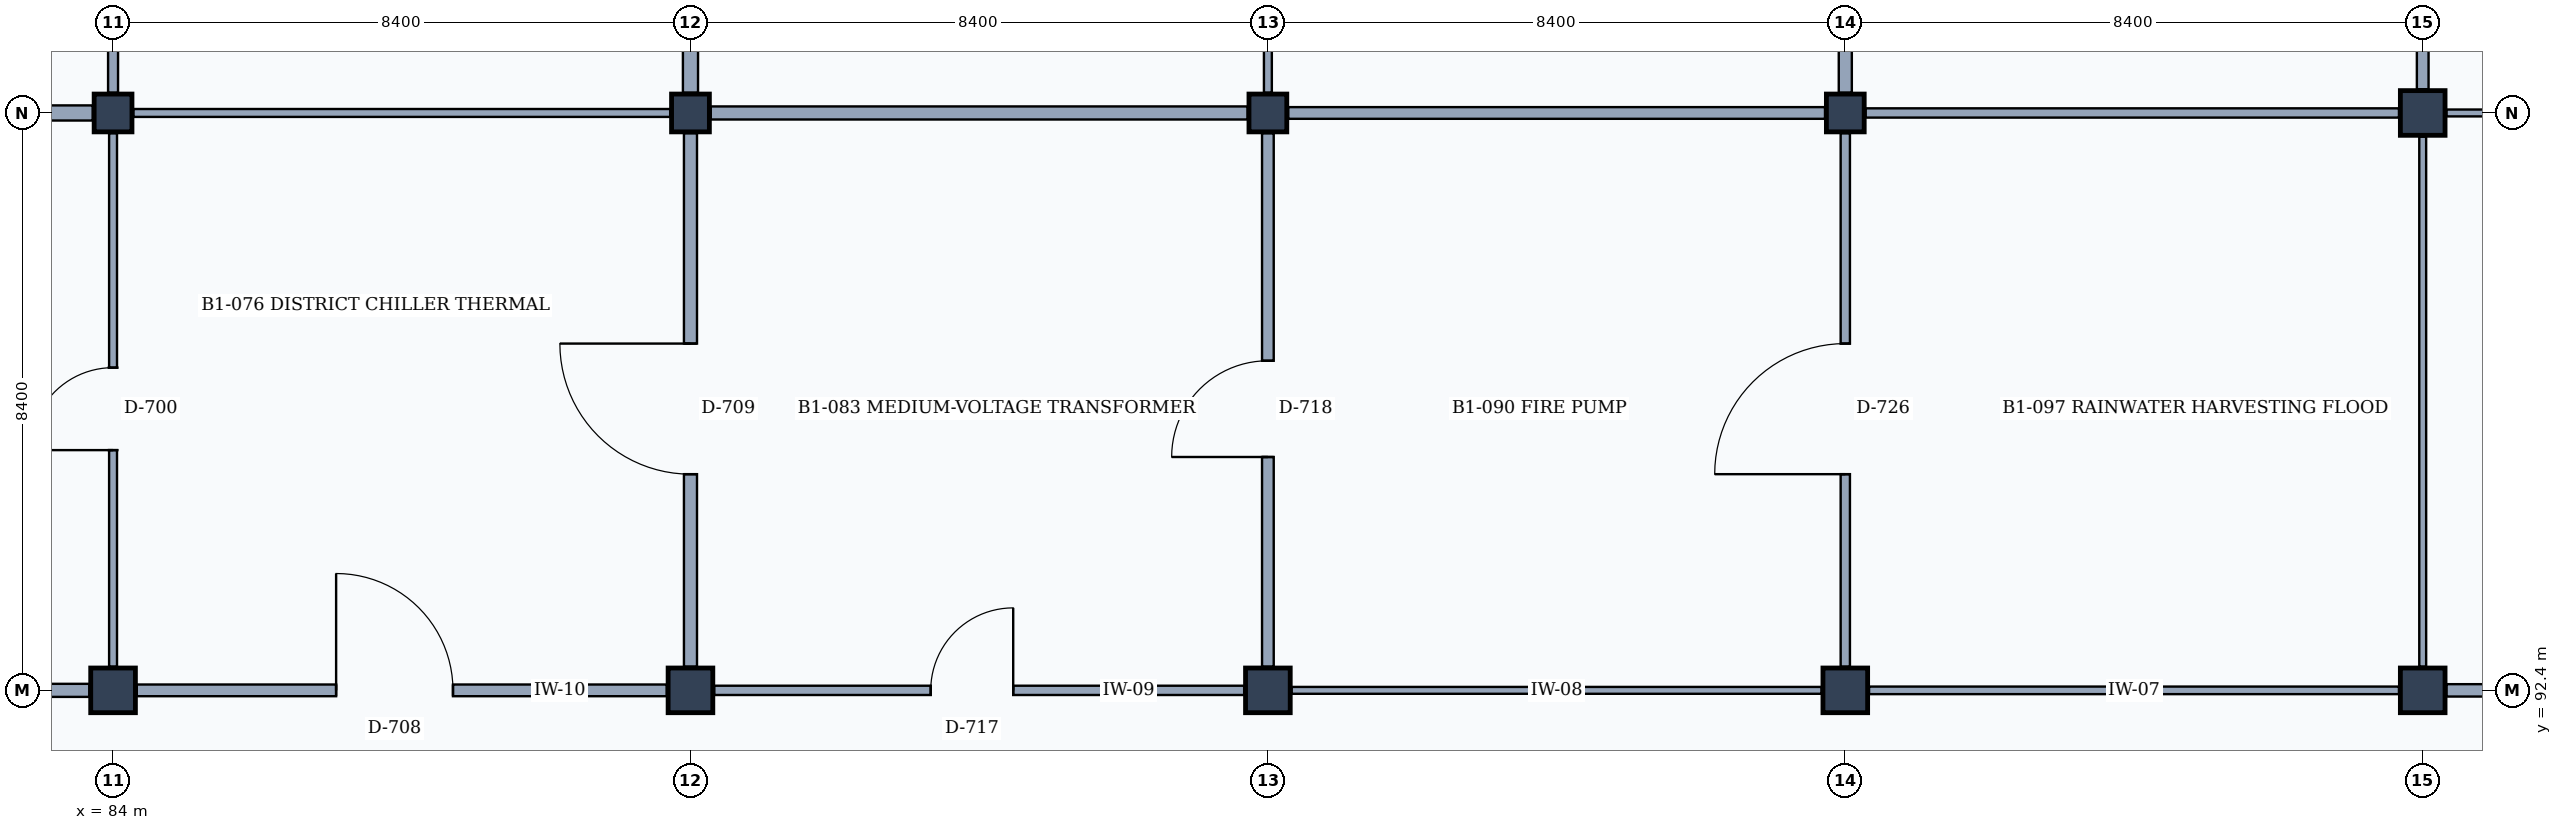
"""IFC4 building model, lengths in metres.
Left out: names, types, materials, properties, quantities, classifications, styles, units other than length and angle.
Written with IfcOpenShell. Run it as: python <this file> out.ifc"""

import sys

from ifc_helpers import new_model, si_unit, direction, frame, frame_2d, origin, origin_2d, place, context, subcontext, project, spatial, rectangle, extrude, element, fill, save


model = new_model("IFC4")
c1 = context("Model", 3, precision=1e-05, world=origin(), true_north=direction((0.0, 1.0)))
c2 = subcontext(c1, "Body", "Model", "MODEL_VIEW")
j1 = project(units=[si_unit("LENGTHUNIT", "METRE"), si_unit("PLANEANGLEUNIT", "RADIAN")], contexts=[c1])
p1 = place(None, origin())
s1 = spatial("IfcSite", under=j1, at=p1, CompositionType="ELEMENT")
p2 = place(p1, origin())
s2 = spatial("IfcBuilding", under=s1, at=p2, CompositionType="ELEMENT")
p3 = place(p2, frame((0.0, 0.0, -4.2)))
s3 = spatial("IfcBuildingStorey", under=s2, at=p3, CompositionType="ELEMENT", Elevation=-4.2)
p4 = place(p3, frame((84.0, 92.4, 0.0), z_axis=(0.0, 0.0, 1.0), x_axis=(1.0, 0.0, 0.0)))
e1 = element("IfcColumn", 1, at=p4, inside=s3, PredefinedType="COLUMN", context=c2, shape_type="SweptSolid", body=[
    extrude(rectangle(XDim=0.65, YDim=0.65, at=origin_2d()), origin(), (0.0, 0.0, 1.0), 4.2),
])
p5 = place(p3, frame((84.0, 100.8, 0.0), z_axis=(0.0, 0.0, 1.0), x_axis=(1.0, 0.0, 0.0)))
e2 = element("IfcColumn", 2, at=p5, inside=s3, PredefinedType="COLUMN", context=c2, shape_type="SweptSolid", body=[
    extrude(rectangle(XDim=0.55, YDim=0.55, at=origin_2d()), origin(), (0.0, 0.0, 1.0), 4.2),
])
p6 = place(p3, frame((92.4, 92.4, 0.0), z_axis=(0.0, 0.0, 1.0), x_axis=(1.0, 0.0, 0.0)))
e3 = element("IfcColumn", 3, at=p6, inside=s3, PredefinedType="COLUMN", context=c2, shape_type="SweptSolid", body=[
    extrude(rectangle(XDim=0.65, YDim=0.65, at=origin_2d()), origin(), (0.0, 0.0, 1.0), 4.2),
])
p7 = place(p3, frame((92.4, 100.8, 0.0), z_axis=(0.0, 0.0, 1.0), x_axis=(1.0, 0.0, 0.0)))
e4 = element("IfcColumn", 4, at=p7, inside=s3, PredefinedType="COLUMN", context=c2, shape_type="SweptSolid", body=[
    extrude(rectangle(XDim=0.55, YDim=0.55, at=origin_2d()), origin(), (0.0, 0.0, 1.0), 4.2),
])
p8 = place(p3, frame((100.8, 92.4, 0.0), z_axis=(0.0, 0.0, 1.0), x_axis=(1.0, 0.0, 0.0)))
e5 = element("IfcColumn", 5, at=p8, inside=s3, PredefinedType="COLUMN", context=c2, shape_type="SweptSolid", body=[
    extrude(rectangle(XDim=0.65, YDim=0.65, at=origin_2d()), origin(), (0.0, 0.0, 1.0), 4.2),
])
p9 = place(p3, frame((100.8, 100.8, 0.0), z_axis=(0.0, 0.0, 1.0), x_axis=(1.0, 0.0, 0.0)))
e6 = element("IfcColumn", 6, at=p9, inside=s3, PredefinedType="COLUMN", context=c2, shape_type="SweptSolid", body=[
    extrude(rectangle(XDim=0.55, YDim=0.55, at=origin_2d()), origin(), (0.0, 0.0, 1.0), 4.2),
])
p10 = place(p3, frame((109.2, 92.4, 0.0), z_axis=(0.0, 0.0, 1.0), x_axis=(1.0, 0.0, 0.0)))
e7 = element("IfcColumn", 7, at=p10, inside=s3, PredefinedType="COLUMN", context=c2, shape_type="SweptSolid", body=[
    extrude(rectangle(XDim=0.65, YDim=0.65, at=origin_2d()), origin(), (0.0, 0.0, 1.0), 4.2),
])
p11 = place(p3, frame((109.2, 100.8, 0.0), z_axis=(0.0, 0.0, 1.0), x_axis=(1.0, 0.0, 0.0)))
e8 = element("IfcColumn", 8, at=p11, inside=s3, PredefinedType="COLUMN", context=c2, shape_type="SweptSolid", body=[
    extrude(rectangle(XDim=0.55, YDim=0.55, at=origin_2d()), origin(), (0.0, 0.0, 1.0), 4.2),
])
for number, where, z_axis, x_axis in (
    (9, (117.6, 92.4, 0.0), (0.0, 0.0, 1.0), (1.0, 0.0, 0.0)),
    (10, (117.6, 100.8, 0.0), (0.0, 0.0, 1.0), (1.0, 0.0, 0.0)),
):
    element("IfcColumn", number, at=place(p3, frame(where, z_axis=z_axis, x_axis=x_axis)), inside=s3, PredefinedType="COLUMN", context=c2, shape_type="SweptSolid", body=[
        extrude(rectangle(XDim=0.65, YDim=0.65, at=origin_2d()), origin(), (0.0, 0.0, 1.0), 4.2),
    ])
p12 = place(p3, frame((75.945, 92.4, 0.0), z_axis=(0.0, 0.0, 1.0), x_axis=(1.0, 0.0, 0.0)))
e11 = element("IfcWall", 11, at=p12, inside=s3, PredefinedType="PARTITIONING", context=c2, shape_type="SweptSolid", body=[
    extrude(rectangle(XDim=7.71, YDim=0.19, at=frame_2d((3.855, 0.0))), origin(), (0.0, 0.0, 1.0), 2.93),
])
p13 = place(p12, frame((2.85, 0.0, 0.0)))
e12 = element("IfcOpeningElement", 12, at=p13, cuts=e11, PredefinedType="OPENING", context=c2, shape_type="SweptSolid", body=[
    extrude(rectangle(XDim=1.8, YDim=2.3, at=frame_2d((0.9, 1.15))), frame((0.0, 0.105, 0.0), z_axis=(0.0, -1.0, 0.0), x_axis=(1.0, 0.0, 0.0)), (0.0, 0.0, 1.0), 0.21),
])
p14 = place(p3, frame((84.0, 92.745, 0.0), z_axis=(0.0, 0.0, 1.0), x_axis=(0.0, 1.0, 0.0)))
e13 = element("IfcWall", 13, at=p14, inside=s3, PredefinedType="PARTITIONING", context=c2, shape_type="SweptSolid", body=[
    extrude(rectangle(XDim=7.76, YDim=0.115, at=frame_2d((3.88, 0.0))), origin(), (0.0, 0.0, 1.0), 3.23),
])
p15 = place(p14, frame((3.15, 0.0, 0.0)))
e14 = element("IfcOpeningElement", 14, at=p15, cuts=e13, PredefinedType="OPENING", context=c2, shape_type="SweptSolid", body=[
    extrude(rectangle(XDim=1.2, YDim=2.2, at=frame_2d((0.6, 1.1))), frame((0.0, 0.067, 0.0), z_axis=(0.0, -1.0, 0.0), x_axis=(1.0, 0.0, 0.0)), (0.0, 0.0, 1.0), 0.135),
])
p16 = place(p3, frame((75.895, 100.8, 0.0), z_axis=(0.0, 0.0, 1.0), x_axis=(1.0, 0.0, 0.0)))
e15 = element("IfcWall", 15, at=p16, inside=s3, PredefinedType="PARTITIONING", context=c2, shape_type="SweptSolid", body=[
    extrude(rectangle(XDim=7.81, YDim=0.22, at=frame_2d((3.905, 0.0))), origin(), (0.0, 0.0, 1.0), 2.93),
])
p17 = place(p3, frame((84.0, 101.095, 0.0), z_axis=(0.0, 0.0, 1.0), x_axis=(0.0, 1.0, 0.0)))
e16 = element("IfcWall", 16, at=p17, inside=s3, PredefinedType="PARTITIONING", context=c2, shape_type="SweptSolid", body=[
    extrude(rectangle(XDim=7.81, YDim=0.145, at=frame_2d((3.905, 0.0))), origin(), (0.0, 0.0, 1.0), 3.23),
])
p18 = place(p17, frame((3.05, 0.0, 0.0)))
e17 = element("IfcOpeningElement", 17, at=p18, cuts=e16, PredefinedType="OPENING", context=c2, shape_type="SweptSolid", body=[
    extrude(rectangle(XDim=1.4, YDim=2.25, at=frame_2d((0.7, 1.125))), frame((0.0, 0.083, 0.0), z_axis=(0.0, -1.0, 0.0), x_axis=(1.0, 0.0, 0.0)), (0.0, 0.0, 1.0), 0.165),
])
p19 = place(p3, frame((84.345, 92.4, 0.0), z_axis=(0.0, 0.0, 1.0), x_axis=(1.0, 0.0, 0.0)))
e18 = element("IfcWall", 18, at=p19, inside=s3, PredefinedType="PARTITIONING", context=c2, shape_type="SweptSolid", body=[
    extrude(rectangle(XDim=7.71, YDim=0.17, at=frame_2d((3.855, 0.0))), origin(), (0.0, 0.0, 1.0), 2.93),
])
p20 = place(p19, frame((2.9, 0.0, 0.0)))
e19 = element("IfcOpeningElement", 19, at=p20, cuts=e18, PredefinedType="OPENING", context=c2, shape_type="SweptSolid", body=[
    extrude(rectangle(XDim=1.7, YDim=2.3, at=frame_2d((0.85, 1.15))), frame((0.0, 0.095, 0.0), z_axis=(0.0, -1.0, 0.0), x_axis=(1.0, 0.0, 0.0)), (0.0, 0.0, 1.0), 0.19),
])
p21 = place(p3, frame((92.4, 92.745, 0.0), z_axis=(0.0, 0.0, 1.0), x_axis=(0.0, 1.0, 0.0)))
e20 = element("IfcWall", 20, at=p21, inside=s3, PredefinedType="PARTITIONING", context=c2, shape_type="SweptSolid", body=[
    extrude(rectangle(XDim=7.76, YDim=0.19, at=frame_2d((3.88, 0.0))), origin(), (0.0, 0.0, 1.0), 3.23),
])
p22 = place(p21, frame((2.8, 0.0, 0.0)))
e21 = element("IfcOpeningElement", 21, at=p22, cuts=e20, PredefinedType="OPENING", context=c2, shape_type="SweptSolid", body=[
    extrude(rectangle(XDim=1.9, YDim=2.4, at=frame_2d((0.95, 1.2))), frame((0.0, 0.105, 0.0), z_axis=(0.0, -1.0, 0.0), x_axis=(1.0, 0.0, 0.0)), (0.0, 0.0, 1.0), 0.21),
])
p23 = place(p3, frame((84.295, 100.8, 0.0), z_axis=(0.0, 0.0, 1.0), x_axis=(1.0, 0.0, 0.0)))
e22 = element("IfcWall", 22, at=p23, inside=s3, PredefinedType="PARTITIONING", context=c2, shape_type="SweptSolid", body=[
    extrude(rectangle(XDim=7.81, YDim=0.115, at=frame_2d((3.905, 0.0))), origin(), (0.0, 0.0, 1.0), 2.93),
])
p24 = place(p3, frame((92.4, 101.095, 0.0), z_axis=(0.0, 0.0, 1.0), x_axis=(0.0, 1.0, 0.0)))
e23 = element("IfcWall", 23, at=p24, inside=s3, PredefinedType="PARTITIONING", context=c2, shape_type="SweptSolid", body=[
    extrude(rectangle(XDim=7.81, YDim=0.22, at=frame_2d((3.905, 0.0))), origin(), (0.0, 0.0, 1.0), 3.23),
])
p25 = place(p24, frame((3.3, 0.0, 0.0)))
e24 = element("IfcOpeningElement", 24, at=p25, cuts=e23, PredefinedType="OPENING", context=c2, shape_type="SweptSolid", body=[
    extrude(rectangle(XDim=0.9, YDim=2.1, at=frame_2d((0.45, 1.05))), frame((0.0, 0.12, 0.0), z_axis=(0.0, -1.0, 0.0), x_axis=(1.0, 0.0, 0.0)), (0.0, 0.0, 1.0), 0.24),
])
p26 = place(p3, frame((92.745, 92.4, 0.0), z_axis=(0.0, 0.0, 1.0), x_axis=(1.0, 0.0, 0.0)))
e25 = element("IfcWall", 25, at=p26, inside=s3, PredefinedType="PARTITIONING", context=c2, shape_type="SweptSolid", body=[
    extrude(rectangle(XDim=7.71, YDim=0.135, at=frame_2d((3.855, 0.0))), origin(), (0.0, 0.0, 1.0), 2.93),
])
p27 = place(p26, frame((3.15, 0.0, 0.0)))
e26 = element("IfcOpeningElement", 26, at=p27, cuts=e25, PredefinedType="OPENING", context=c2, shape_type="SweptSolid", body=[
    extrude(rectangle(XDim=1.2, YDim=2.2, at=frame_2d((0.6, 1.1))), frame((0.0, 0.077, 0.0), z_axis=(0.0, -1.0, 0.0), x_axis=(1.0, 0.0, 0.0)), (0.0, 0.0, 1.0), 0.155),
])
p28 = place(p3, frame((100.8, 92.745, 0.0), z_axis=(0.0, 0.0, 1.0), x_axis=(0.0, 1.0, 0.0)))
e27 = element("IfcWall", 27, at=p28, inside=s3, PredefinedType="PARTITIONING", context=c2, shape_type="SweptSolid", body=[
    extrude(rectangle(XDim=7.76, YDim=0.17, at=frame_2d((3.88, 0.0))), origin(), (0.0, 0.0, 1.0), 3.23),
])
p29 = place(p28, frame((3.05, 0.0, 0.0)))
e28 = element("IfcOpeningElement", 28, at=p29, cuts=e27, PredefinedType="OPENING", context=c2, shape_type="SweptSolid", body=[
    extrude(rectangle(XDim=1.4, YDim=2.25, at=frame_2d((0.7, 1.125))), frame((0.0, 0.095, 0.0), z_axis=(0.0, -1.0, 0.0), x_axis=(1.0, 0.0, 0.0)), (0.0, 0.0, 1.0), 0.19),
])
p30 = place(p3, frame((92.695, 100.8, 0.0), z_axis=(0.0, 0.0, 1.0), x_axis=(1.0, 0.0, 0.0)))
e29 = element("IfcWall", 29, at=p30, inside=s3, PredefinedType="PARTITIONING", context=c2, shape_type="SweptSolid", body=[
    extrude(rectangle(XDim=7.81, YDim=0.19, at=frame_2d((3.905, 0.0))), origin(), (0.0, 0.0, 1.0), 2.93),
])
p31 = place(p3, frame((100.8, 101.095, 0.0), z_axis=(0.0, 0.0, 1.0), x_axis=(0.0, 1.0, 0.0)))
e30 = element("IfcWall", 30, at=p31, inside=s3, PredefinedType="PARTITIONING", context=c2, shape_type="SweptSolid", body=[
    extrude(rectangle(XDim=7.81, YDim=0.115, at=frame_2d((3.905, 0.0))), origin(), (0.0, 0.0, 1.0), 3.23),
])
p32 = place(p31, frame((3.0, 0.0, 0.0)))
e31 = element("IfcOpeningElement", 31, at=p32, cuts=e30, PredefinedType="OPENING", context=c2, shape_type="SweptSolid", body=[
    extrude(rectangle(XDim=1.5, YDim=2.3, at=frame_2d((0.75, 1.15))), frame((0.0, 0.067, 0.0), z_axis=(0.0, -1.0, 0.0), x_axis=(1.0, 0.0, 0.0)), (0.0, 0.0, 1.0), 0.135),
])
p33 = place(p3, frame((101.145, 92.4, 0.0), z_axis=(0.0, 0.0, 1.0), x_axis=(1.0, 0.0, 0.0)))
e32 = element("IfcWall", 32, at=p33, inside=s3, PredefinedType="MOVABLE", context=c2, shape_type="SweptSolid", body=[
    extrude(rectangle(XDim=7.71, YDim=0.1, at=frame_2d((3.855, 0.0))), origin(), (0.0, 0.0, 1.0), 2.93),
])
p34 = place(p3, frame((109.2, 92.745, 0.0), z_axis=(0.0, 0.0, 1.0), x_axis=(0.0, 1.0, 0.0)))
e33 = element("IfcWall", 33, at=p34, inside=s3, PredefinedType="PARTITIONING", context=c2, shape_type="SweptSolid", body=[
    extrude(rectangle(XDim=7.76, YDim=0.135, at=frame_2d((3.88, 0.0))), origin(), (0.0, 0.0, 1.0), 3.23),
])
p35 = place(p34, frame((2.8, 0.0, 0.0)))
e34 = element("IfcOpeningElement", 34, at=p35, cuts=e33, PredefinedType="OPENING", context=c2, shape_type="SweptSolid", body=[
    extrude(rectangle(XDim=1.9, YDim=2.4, at=frame_2d((0.95, 1.2))), frame((0.0, 0.077, 0.0), z_axis=(0.0, -1.0, 0.0), x_axis=(1.0, 0.0, 0.0)), (0.0, 0.0, 1.0), 0.155),
])
p36 = place(p3, frame((101.095, 100.8, 0.0), z_axis=(0.0, 0.0, 1.0), x_axis=(1.0, 0.0, 0.0)))
e35 = element("IfcWall", 35, at=p36, inside=s3, PredefinedType="PARTITIONING", context=c2, shape_type="SweptSolid", body=[
    extrude(rectangle(XDim=7.81, YDim=0.17, at=frame_2d((3.905, 0.0))), origin(), (0.0, 0.0, 1.0), 2.93),
])
p37 = place(p3, frame((109.2, 101.095, 0.0), z_axis=(0.0, 0.0, 1.0), x_axis=(0.0, 1.0, 0.0)))
e36 = element("IfcWall", 36, at=p37, inside=s3, PredefinedType="PARTITIONING", context=c2, shape_type="SweptSolid", body=[
    extrude(rectangle(XDim=7.81, YDim=0.19, at=frame_2d((3.905, 0.0))), origin(), (0.0, 0.0, 1.0), 3.23),
])
p38 = place(p37, frame((3.3, 0.0, 0.0)))
e37 = element("IfcOpeningElement", 37, at=p38, cuts=e36, PredefinedType="OPENING", context=c2, shape_type="SweptSolid", body=[
    extrude(rectangle(XDim=0.9, YDim=2.1, at=frame_2d((0.45, 1.05))), frame((0.0, 0.105, 0.0), z_axis=(0.0, -1.0, 0.0), x_axis=(1.0, 0.0, 0.0)), (0.0, 0.0, 1.0), 0.21),
])
p39 = place(p3, frame((109.545, 92.4, 0.0), z_axis=(0.0, 0.0, 1.0), x_axis=(1.0, 0.0, 0.0)))
e38 = element("IfcWall", 38, at=p39, inside=s3, PredefinedType="PARTITIONING", context=c2, shape_type="SweptSolid", body=[
    extrude(rectangle(XDim=7.71, YDim=0.11, at=frame_2d((3.855, 0.0))), origin(), (0.0, 0.0, 1.0), 2.93),
])
p40 = place(p3, frame((117.6, 92.745, 0.0), z_axis=(0.0, 0.0, 1.0), x_axis=(0.0, 1.0, 0.0)))
e39 = element("IfcWall", 39, at=p40, inside=s3, PredefinedType="MOVABLE", context=c2, shape_type="SweptSolid", body=[
    extrude(rectangle(XDim=7.71, YDim=0.1, at=frame_2d((3.855, 0.0))), origin(), (0.0, 0.0, 1.0), 3.23),
])
p41 = place(p3, frame((109.495, 100.8, 0.0), z_axis=(0.0, 0.0, 1.0), x_axis=(1.0, 0.0, 0.0)))
e40 = element("IfcWall", 40, at=p41, inside=s3, PredefinedType="PARTITIONING", context=c2, shape_type="SweptSolid", body=[
    extrude(rectangle(XDim=7.76, YDim=0.135, at=frame_2d((3.88, 0.0))), origin(), (0.0, 0.0, 1.0), 2.93),
])
p42 = place(p3, frame((117.6, 101.145, 0.0), z_axis=(0.0, 0.0, 1.0), x_axis=(0.0, 1.0, 0.0)))
e41 = element("IfcWall", 41, at=p42, inside=s3, PredefinedType="PARTITIONING", context=c2, shape_type="SweptSolid", body=[
    extrude(rectangle(XDim=7.71, YDim=0.17, at=frame_2d((3.855, 0.0))), origin(), (0.0, 0.0, 1.0), 3.23),
])
p43 = place(p3, frame((117.945, 92.4, 0.0), z_axis=(0.0, 0.0, 1.0), x_axis=(1.0, 0.0, 0.0)))
e42 = element("IfcWall", 42, at=p43, inside=s3, PredefinedType="PARTITIONING", context=c2, shape_type="SweptSolid", body=[
    extrude(rectangle(XDim=7.71, YDim=0.18, at=frame_2d((3.855, 0.0))), origin(), (0.0, 0.0, 1.0), 2.93),
])
p44 = place(p43, frame((3.1, 0.0, 0.0)))
e43 = element("IfcOpeningElement", 43, at=p44, cuts=e42, PredefinedType="OPENING", context=c2, shape_type="SweptSolid", body=[
    extrude(rectangle(XDim=1.3, YDim=2.2, at=frame_2d((0.65, 1.1))), frame((0.0, 0.1, 0.0), z_axis=(0.0, -1.0, 0.0), x_axis=(1.0, 0.0, 0.0)), (0.0, 0.0, 1.0), 0.2),
])
p45 = place(p3, frame((117.945, 100.8, 0.0), z_axis=(0.0, 0.0, 1.0), x_axis=(1.0, 0.0, 0.0)))
e44 = element("IfcWall", 44, at=p45, inside=s3, PredefinedType="MOVABLE", context=c2, shape_type="SweptSolid", body=[
    extrude(rectangle(XDim=7.71, YDim=0.1, at=frame_2d((3.855, 0.0))), origin(), (0.0, 0.0, 1.0), 2.93),
])
p46 = place(p15, origin())
e45 = element("IfcDoor", 45, at=p46, inside=s3, OperationType="SINGLE_SWING_LEFT", PredefinedType="DOOR", context=c2, shape_type="SweptSolid", body=[
    extrude(rectangle(XDim=1.2, YDim=2.2, at=frame_2d((0.6, 1.1))), frame((0.0, 0.025, 0.0), z_axis=(0.0, -1.0, 0.0), x_axis=(1.0, 0.0, 0.0)), (0.0, 0.0, 1.0), 0.05),
])
fill(e14, e45)
p47 = place(p20, origin())
e46 = element("IfcDoor", 46, at=p47, inside=s3, OperationType="SINGLE_SWING_LEFT", PredefinedType="DOOR", context=c2, shape_type="SweptSolid", body=[
    extrude(rectangle(XDim=1.7, YDim=2.3, at=frame_2d((0.85, 1.15))), frame((0.0, 0.025, 0.0), z_axis=(0.0, -1.0, 0.0), x_axis=(1.0, 0.0, 0.0)), (0.0, 0.0, 1.0), 0.05),
])
fill(e19, e46)
p48 = place(p22, origin())
e47 = element("IfcDoor", 47, at=p48, inside=s3, OperationType="SINGLE_SWING_RIGHT", PredefinedType="DOOR", context=c2, shape_type="SweptSolid", body=[
    extrude(rectangle(XDim=1.9, YDim=2.4, at=frame_2d((0.95, 1.2))), frame((0.0, 0.025, 0.0), z_axis=(0.0, -1.0, 0.0), x_axis=(1.0, 0.0, 0.0)), (0.0, 0.0, 1.0), 0.05),
])
fill(e21, e47)
p49 = place(p27, origin())
e48 = element("IfcDoor", 48, at=p49, inside=s3, OperationType="SINGLE_SWING_RIGHT", PredefinedType="DOOR", context=c2, shape_type="SweptSolid", body=[
    extrude(rectangle(XDim=1.2, YDim=2.2, at=frame_2d((0.6, 1.1))), frame((0.0, 0.025, 0.0), z_axis=(0.0, -1.0, 0.0), x_axis=(1.0, 0.0, 0.0)), (0.0, 0.0, 1.0), 0.05),
])
fill(e26, e48)
p50 = place(p29, origin())
e49 = element("IfcDoor", 49, at=p50, inside=s3, OperationType="SINGLE_SWING_LEFT", PredefinedType="DOOR", context=c2, shape_type="SweptSolid", body=[
    extrude(rectangle(XDim=1.4, YDim=2.25, at=frame_2d((0.7, 1.125))), frame((0.0, 0.025, 0.0), z_axis=(0.0, -1.0, 0.0), x_axis=(1.0, 0.0, 0.0)), (0.0, 0.0, 1.0), 0.05),
])
fill(e28, e49)
p51 = place(p35, origin())
e50 = element("IfcDoor", 50, at=p51, inside=s3, OperationType="SINGLE_SWING_LEFT", PredefinedType="DOOR", context=c2, shape_type="SweptSolid", body=[
    extrude(rectangle(XDim=1.9, YDim=2.4, at=frame_2d((0.95, 1.2))), frame((0.0, 0.025, 0.0), z_axis=(0.0, -1.0, 0.0), x_axis=(1.0, 0.0, 0.0)), (0.0, 0.0, 1.0), 0.05),
])
fill(e34, e50)
save(model, sys.argv[1])
